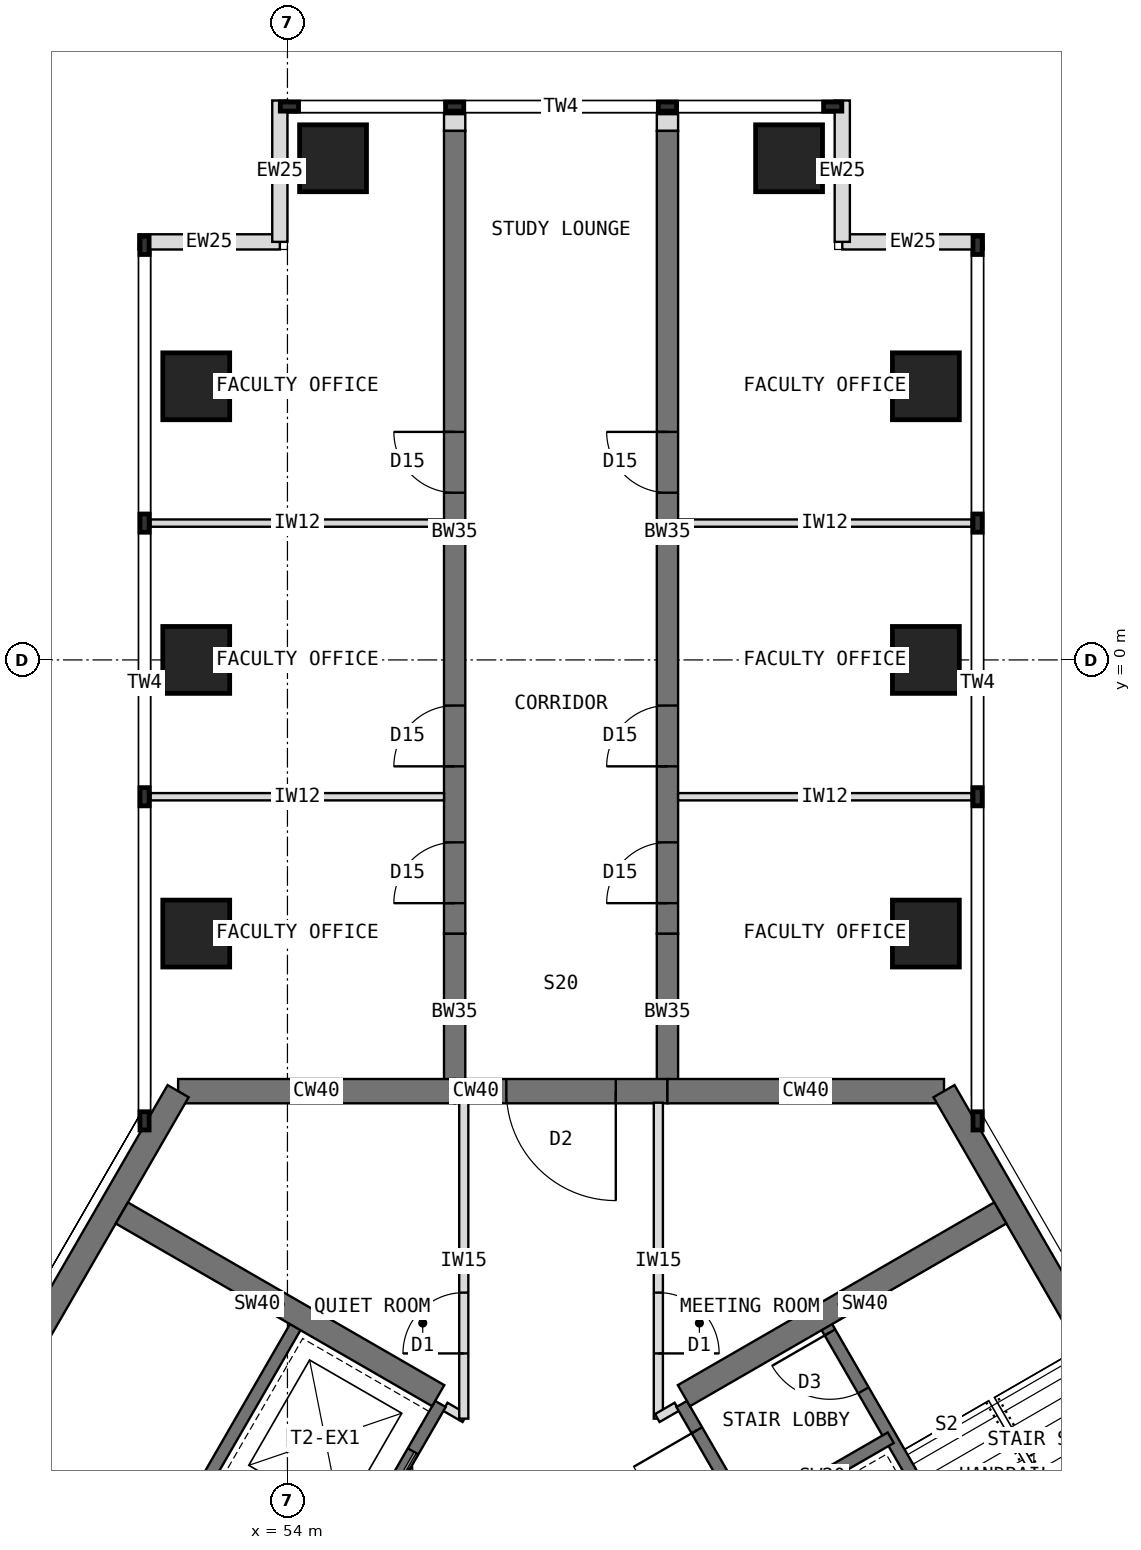
"""IFC4 building model, lengths in metres.
Left out: names, types, materials, properties, quantities, classifications, styles, units other than length and angle.
Written with IfcOpenShell. Run it as: python <this file> out.ifc"""

import sys

from ifc_helpers import new_model, si_unit, direction, frame, frame_2d, origin, origin_2d, place, context, subcontext, project, spatial, rectangle, extrude, element, fill, save


model = new_model("IFC4")
c1 = context("Model", 3, precision=1e-05, world=origin(), true_north=direction((0.0, 1.0)))
c2 = subcontext(c1, "Body", "Model", "MODEL_VIEW")
j1 = project(units=[si_unit("LENGTHUNIT", "METRE"), si_unit("PLANEANGLEUNIT", "RADIAN")], contexts=[c1])
p1 = place(None, origin())
s1 = spatial("IfcSite", under=j1, at=p1, CompositionType="ELEMENT")
p2 = place(p1, origin())
s2 = spatial("IfcBuilding", under=s1, at=p2, CompositionType="ELEMENT")
p3 = place(p2, frame((0.0, 0.0, 243.5)))
s3 = spatial("IfcBuildingStorey", under=s2, at=p3, CompositionType="ELEMENT", Elevation=243.5)
p4 = place(p3, frame((64.798, -7.092, 0.0), z_axis=(0.0, 0.0, 1.0), x_axis=(-1.0, 0.0, 0.0)))
e1 = element("IfcWall", 1, at=p4, inside=s3, PredefinedType="SHEAR", context=c2, shape_type="SweptSolid", body=[
    extrude(rectangle(XDim=4.548, YDim=0.4, at=frame_2d((2.274, 0.0))), origin(), (0.0, 0.0, 1.0), 4.0),
])
p5 = place(p3, frame((60.25, -7.092, 0.0), z_axis=(0.0, 0.0, 1.0), x_axis=(-1.0, 0.0, 0.0)))
e2 = element("IfcWall", 2, at=p5, inside=s3, PredefinedType="SHEAR", context=c2, shape_type="SweptSolid", body=[
    extrude(rectangle(XDim=3.5, YDim=0.4, at=frame_2d((1.75, 0.0))), origin(), (0.0, 0.0, 1.0), 4.0),
])
p6 = place(p5, frame((0.85, 0.0, 0.0)))
e3 = element("IfcOpeningElement", 3, at=p6, cuts=e2, PredefinedType="OPENING", context=c2, shape_type="SweptSolid", body=[
    extrude(rectangle(XDim=1.8, YDim=2.1, at=frame_2d((0.9, 1.05))), frame((0.0, 0.21, 0.0), z_axis=(0.0, -1.0, 0.0), x_axis=(1.0, 0.0, 0.0)), (0.0, 0.0, 1.0), 0.42),
])
p7 = place(p3, frame((56.75, -7.092, 0.0), z_axis=(0.0, 0.0, 1.0), x_axis=(-1.0, 0.0, 0.0)))
e4 = element("IfcWall", 4, at=p7, inside=s3, PredefinedType="SHEAR", context=c2, shape_type="SweptSolid", body=[
    extrude(rectangle(XDim=4.548, YDim=0.4, at=frame_2d((2.274, 0.0))), origin(), (0.0, 0.0, 1.0), 4.0),
])
for number, where, z_axis, x_axis in (
    (5, (52.202, -7.092, 0.0), (0.0, 0.0, 1.0), (-0.5, -0.866, 0.0)),
    (6, (71.096, -18.0, 0.0), (0.0, 0.0, 1.0), (-0.5, 0.866, 0.0)),
):
    element("IfcWall", number, at=place(p3, frame(where, z_axis=z_axis, x_axis=x_axis)), inside=s3, PredefinedType="SHEAR", context=c2, shape_type="SweptSolid", body=[
        extrude(rectangle(XDim=12.596, YDim=0.4, at=frame_2d((6.298, 0.0))), origin(), (0.0, 0.0, 1.0), 4.0),
    ])
p8 = place(p3, frame((56.75, -7.092, 0.0), z_axis=(0.0, 0.0, 1.0), x_axis=(0.0, 1.0, 0.0)))
e7 = element("IfcWall", 7, at=p8, inside=s3, PredefinedType="SHEAR", context=c2, shape_type="SweptSolid", body=[
    extrude(rectangle(XDim=2.592, YDim=0.35, at=frame_2d((1.296, 0.0))), origin(), (0.0, 0.0, 1.0), 4.0),
])
p9 = place(p3, frame((56.75, -4.5, 0.0), z_axis=(0.0, 0.0, 1.0), x_axis=(0.0, 1.0, 0.0)))
e8 = element("IfcWall", 8, at=p9, inside=s3, PredefinedType="SHEAR", context=c2, shape_type="SweptSolid", body=[
    extrude(rectangle(XDim=13.2, YDim=0.35, at=frame_2d((6.6, 0.0))), origin(), (0.0, 0.0, 1.0), 4.0),
])
p10 = place(p9, frame((0.5, 0.0, 0.0)))
e9 = element("IfcOpeningElement", 9, at=p10, cuts=e8, PredefinedType="OPENING", context=c2, shape_type="SweptSolid", body=[
    extrude(rectangle(XDim=1.0, YDim=2.1, at=frame_2d((0.5, 1.05))), frame((0.0, 0.185, 0.0), z_axis=(0.0, -1.0, 0.0), x_axis=(1.0, 0.0, 0.0)), (0.0, 0.0, 1.0), 0.37),
])
p11 = place(p9, frame((2.75, 0.0, 0.0)))
e10 = element("IfcOpeningElement", 10, at=p11, cuts=e8, PredefinedType="OPENING", context=c2, shape_type="SweptSolid", body=[
    extrude(rectangle(XDim=1.0, YDim=2.1, at=frame_2d((0.5, 1.05))), frame((0.0, 0.185, 0.0), z_axis=(0.0, -1.0, 0.0), x_axis=(1.0, 0.0, 0.0)), (0.0, 0.0, 1.0), 0.37),
])
p12 = place(p9, frame((7.25, 0.0, 0.0)))
e11 = element("IfcOpeningElement", 11, at=p12, cuts=e8, PredefinedType="OPENING", context=c2, shape_type="SweptSolid", body=[
    extrude(rectangle(XDim=1.0, YDim=2.1, at=frame_2d((0.5, 1.05))), frame((0.0, 0.185, 0.0), z_axis=(0.0, -1.0, 0.0), x_axis=(1.0, 0.0, 0.0)), (0.0, 0.0, 1.0), 0.37),
])
p13 = place(p3, frame((60.25, -7.092, 0.0), z_axis=(0.0, 0.0, 1.0), x_axis=(0.0, 1.0, 0.0)))
e12 = element("IfcWall", 12, at=p13, inside=s3, PredefinedType="SHEAR", context=c2, shape_type="SweptSolid", body=[
    extrude(rectangle(XDim=2.592, YDim=0.35, at=frame_2d((1.296, 0.0))), origin(), (0.0, 0.0, 1.0), 4.0),
])
p14 = place(p3, frame((60.25, -4.5, 0.0), z_axis=(0.0, 0.0, 1.0), x_axis=(0.0, 1.0, 0.0)))
e13 = element("IfcWall", 13, at=p14, inside=s3, PredefinedType="SHEAR", context=c2, shape_type="SweptSolid", body=[
    extrude(rectangle(XDim=13.2, YDim=0.35, at=frame_2d((6.6, 0.0))), origin(), (0.0, 0.0, 1.0), 4.0),
])
p15 = place(p14, frame((0.5, 0.0, 0.0)))
e14 = element("IfcOpeningElement", 14, at=p15, cuts=e13, PredefinedType="OPENING", context=c2, shape_type="SweptSolid", body=[
    extrude(rectangle(XDim=1.0, YDim=2.1, at=frame_2d((0.5, 1.05))), frame((0.0, 0.185, 0.0), z_axis=(0.0, -1.0, 0.0), x_axis=(1.0, 0.0, 0.0)), (0.0, 0.0, 1.0), 0.37),
])
p16 = place(p14, frame((2.75, 0.0, 0.0)))
e15 = element("IfcOpeningElement", 15, at=p16, cuts=e13, PredefinedType="OPENING", context=c2, shape_type="SweptSolid", body=[
    extrude(rectangle(XDim=1.0, YDim=2.1, at=frame_2d((0.5, 1.05))), frame((0.0, 0.185, 0.0), z_axis=(0.0, -1.0, 0.0), x_axis=(1.0, 0.0, 0.0)), (0.0, 0.0, 1.0), 0.37),
])
p17 = place(p14, frame((7.25, 0.0, 0.0)))
e16 = element("IfcOpeningElement", 16, at=p17, cuts=e13, PredefinedType="OPENING", context=c2, shape_type="SweptSolid", body=[
    extrude(rectangle(XDim=1.0, YDim=2.1, at=frame_2d((0.5, 1.05))), frame((0.0, 0.185, 0.0), z_axis=(0.0, -1.0, 0.0), x_axis=(1.0, 0.0, 0.0)), (0.0, 0.0, 1.0), 0.37),
])
for number, where, z_axis, x_axis in (
    (17, (52.5, -4.5, 0.0), (0.0, 0.0, 1.0), (1.0, 0.0, 0.0)),
    (18, (64.5, -4.5, 0.0), (0.0, 0.0, 1.0), (1.0, 0.0, 0.0)),
    (19, (52.5, 0.0, 0.0), (0.0, 0.0, 1.0), (1.0, 0.0, 0.0)),
    (20, (64.5, 0.0, 0.0), (0.0, 0.0, 1.0), (1.0, 0.0, 0.0)),
    (21, (52.5, 4.5, 0.0), (0.0, 0.0, 1.0), (1.0, 0.0, 0.0)),
    (22, (64.5, 4.5, 0.0), (0.0, 0.0, 1.0), (1.0, 0.0, 0.0)),
    (23, (54.75, 8.25, 0.0), (0.0, 0.0, 1.0), (1.0, 0.0, 0.0)),
    (24, (62.25, 8.25, 0.0), (0.0, 0.0, 1.0), (1.0, 0.0, 0.0)),
):
    element("IfcColumn", number, at=place(p3, frame(where, z_axis=z_axis, x_axis=x_axis)), inside=s3, PredefinedType="COLUMN", context=c2, shape_type="SweptSolid", body=[
        extrude(rectangle(XDim=1.1, YDim=1.1, at=origin_2d()), origin(), (0.0, 0.0, 1.0), 4.0),
    ])
for number, where, z_axis, x_axis in (
    (25, (51.55, 6.875, 0.0), (0.0, 0.0, 1.0), (1.0, 0.0, 0.0)),
    (26, (53.875, 6.875, 0.0), (0.0, 0.0, 1.0), (0.0, 1.0, 0.0)),
    (27, (65.45, 6.875, 0.0), (0.0, 0.0, 1.0), (-1.0, 0.0, 0.0)),
    (28, (63.125, 6.875, 0.0), (0.0, 0.0, 1.0), (0.0, 1.0, 0.0)),
):
    element("IfcWall", number, at=place(p3, frame(where, z_axis=z_axis, x_axis=x_axis)), inside=s3, PredefinedType="STANDARD", context=c2, shape_type="SweptSolid", body=[
        extrude(rectangle(XDim=2.325, YDim=0.25, at=frame_2d((1.163, 0.0))), origin(), (0.0, 0.0, 1.0), 3.8),
    ])
for number, where, z_axis, x_axis in (
    (29, (56.75, 8.7, 0.0), (0.0, 0.0, 1.0), (0.0, 1.0, 0.0)),
    (30, (60.25, 8.7, 0.0), (0.0, 0.0, 1.0), (0.0, 1.0, 0.0)),
):
    element("IfcWall", number, at=place(p3, frame(where, z_axis=z_axis, x_axis=x_axis)), inside=s3, PredefinedType="PARTITIONING", context=c2, shape_type="SweptSolid", body=[
        extrude(rectangle(XDim=0.275, YDim=0.35, at=frame_2d((0.138, 0.0))), origin(), (0.0, 0.0, 1.0), 3.8),
    ])
p18 = place(p3, frame((56.516, -12.236, 0.0), z_axis=(0.0, 0.0, 1.0), x_axis=(-0.49999894854, -0.866026010844, 0.0)))
e31 = element("IfcWall", 31, at=p18, inside=s3, PredefinedType="SHEAR", context=c2, shape_type="SweptSolid", body=[
    extrude(rectangle(XDim=8.0, YDim=0.2, at=frame_2d((4.0, 0.0))), origin(), (0.0, 0.0, 1.0), 4.0),
])
p19 = place(p18, frame((6.3, 0.0, 0.0)))
e32 = element("IfcOpeningElement", 32, at=p19, cuts=e31, PredefinedType="OPENING", context=c2, shape_type="SweptSolid", body=[
    extrude(rectangle(XDim=1.2, YDim=2.1, at=frame_2d((0.6, 1.05))), frame((0.0, 0.11, 0.0), z_axis=(0.0, -1.0, 0.0), x_axis=(1.0, 0.0, 0.0)), (0.0, 0.0, 1.0), 0.22),
])
p20 = place(p18, frame((0.9, 0.0, 0.0)))
e33 = element("IfcOpeningElement", 33, at=p20, cuts=e31, PredefinedType="OPENING", context=c2, shape_type="SweptSolid", body=[
    extrude(rectangle(XDim=1.1, YDim=2.2, at=frame_2d((0.55, 1.1))), frame((0.0, 0.11, 0.0), z_axis=(0.0, -1.0, 0.0), x_axis=(1.0, 0.0, 0.0)), (0.0, 0.0, 1.0), 0.22),
])
p21 = place(p18, frame((3.8, 0.0, 0.0)))
e34 = element("IfcOpeningElement", 34, at=p21, cuts=e31, PredefinedType="OPENING", context=c2, shape_type="SweptSolid", body=[
    extrude(rectangle(XDim=1.1, YDim=2.2, at=frame_2d((0.55, 1.1))), frame((0.0, 0.11, 0.0), z_axis=(0.0, -1.0, 0.0), x_axis=(1.0, 0.0, 0.0)), (0.0, 0.0, 1.0), 0.22),
])
p22 = place(p3, frame((54.98, -14.697, 0.0), z_axis=(0.0, 0.0, 1.0), x_axis=(-0.866062058628, 0.499936506574, 0.0)))
e35 = element("IfcWall", 35, at=p22, inside=s3, PredefinedType="SHEAR", context=c2, shape_type="SweptSolid", body=[
    extrude(rectangle(XDim=2.6, YDim=0.2, at=frame_2d((1.3, 0.0))), origin(), (0.0, 0.0, 1.0), 4.0),
])
p23 = place(p3, frame((54.178, -10.886, 0.0), z_axis=(0.0, 0.0, 1.0), x_axis=(-0.49999894854, -0.866026010844, 0.0)))
e36 = element("IfcWall", 36, at=p23, inside=s3, PredefinedType="SHEAR", context=c2, shape_type="SweptSolid", body=[
    extrude(rectangle(XDim=8.0, YDim=0.2, at=frame_2d((4.0, 0.0))), origin(), (0.0, 0.0, 1.0), 4.0),
])
p24 = place(p23, frame((6.8, 0.0, 0.0)))
e37 = element("IfcOpeningElement", 37, at=p24, cuts=e36, PredefinedType="OPENING", context=c2, shape_type="SweptSolid", body=[
    extrude(rectangle(XDim=0.9, YDim=2.1, at=frame_2d((0.45, 1.05))), frame((0.0, 0.11, 0.0), z_axis=(0.0, -1.0, 0.0), x_axis=(1.0, 0.0, 0.0)), (0.0, 0.0, 1.0), 0.22),
])
p25 = place(p3, frame((56.48, -12.099, 0.0), z_axis=(0.0, 0.0, 1.0), x_axis=(-0.866026570101, 0.499997979876, 0.0)))
e38 = element("IfcWall", 38, at=p25, inside=s3, PredefinedType="SHEAR", context=c2, shape_type="SweptSolid", body=[
    extrude(rectangle(XDim=6.008, YDim=0.4, at=frame_2d((3.004, 0.0))), origin(), (0.0, 0.0, 1.0), 4.0),
])
p26 = place(p3, frame((64.484, -19.164, 0.0), z_axis=(0.0, 0.0, 1.0), x_axis=(-0.49999894854, 0.866026010844, 0.0)))
e39 = element("IfcWall", 39, at=p26, inside=s3, PredefinedType="SHEAR", context=c2, shape_type="SweptSolid", body=[
    extrude(rectangle(XDim=8.0, YDim=0.2, at=frame_2d((4.0, 0.0))), origin(), (0.0, 0.0, 1.0), 4.0),
])
p27 = place(p26, frame((6.3, 0.0, 0.0)))
e40 = element("IfcOpeningElement", 40, at=p27, cuts=e39, PredefinedType="OPENING", context=c2, shape_type="SweptSolid", body=[
    extrude(rectangle(XDim=1.2, YDim=2.1, at=frame_2d((0.6, 1.05))), frame((0.0, 0.11, 0.0), z_axis=(0.0, -1.0, 0.0), x_axis=(1.0, 0.0, 0.0)), (0.0, 0.0, 1.0), 0.22),
])
p28 = place(p26, frame((0.9, 0.0, 0.0)))
e41 = element("IfcOpeningElement", 41, at=p28, cuts=e39, PredefinedType="OPENING", context=c2, shape_type="SweptSolid", body=[
    extrude(rectangle(XDim=1.1, YDim=2.2, at=frame_2d((0.55, 1.1))), frame((0.0, 0.11, 0.0), z_axis=(0.0, -1.0, 0.0), x_axis=(1.0, 0.0, 0.0)), (0.0, 0.0, 1.0), 0.22),
])
p29 = place(p26, frame((3.8, 0.0, 0.0)))
e42 = element("IfcOpeningElement", 42, at=p29, cuts=e39, PredefinedType="OPENING", context=c2, shape_type="SweptSolid", body=[
    extrude(rectangle(XDim=1.1, YDim=2.2, at=frame_2d((0.55, 1.1))), frame((0.0, 0.11, 0.0), z_axis=(0.0, -1.0, 0.0), x_axis=(1.0, 0.0, 0.0)), (0.0, 0.0, 1.0), 0.22),
])
p30 = place(p3, frame((61.67, -14.091, 0.0), z_axis=(0.0, 0.0, 1.0), x_axis=(0.86603858612, 0.49997716683, 0.0)))
e43 = element("IfcWall", 43, at=p30, inside=s3, PredefinedType="SHEAR", context=c2, shape_type="SweptSolid", body=[
    extrude(rectangle(XDim=2.6, YDim=0.2, at=frame_2d((1.3, 0.0))), origin(), (0.0, 0.0, 1.0), 4.0),
])
p31 = place(p3, frame((66.822, -17.814, 0.0), z_axis=(0.0, 0.0, 1.0), x_axis=(-0.49999894854, 0.866026010844, 0.0)))
e44 = element("IfcWall", 44, at=p31, inside=s3, PredefinedType="SHEAR", context=c2, shape_type="SweptSolid", body=[
    extrude(rectangle(XDim=8.0, YDim=0.2, at=frame_2d((4.0, 0.0))), origin(), (0.0, 0.0, 1.0), 4.0),
])
p32 = place(p31, frame((6.7, 0.0, 0.0)))
e45 = element("IfcOpeningElement", 45, at=p32, cuts=e44, PredefinedType="OPENING", context=c2, shape_type="SweptSolid", body=[
    extrude(rectangle(XDim=1.1, YDim=2.1, at=frame_2d((0.55, 1.05))), frame((0.0, 0.11, 0.0), z_axis=(0.0, -1.0, 0.0), x_axis=(1.0, 0.0, 0.0)), (0.0, 0.0, 1.0), 0.22),
])
p33 = place(p3, frame((60.52, -12.099, 0.0), z_axis=(0.0, 0.0, 1.0), x_axis=(0.866026570101, 0.499997979876, 0.0)))
e46 = element("IfcWall", 46, at=p33, inside=s3, PredefinedType="SHEAR", context=c2, shape_type="SweptSolid", body=[
    extrude(rectangle(XDim=6.008, YDim=0.4, at=frame_2d((3.004, 0.0))), origin(), (0.0, 0.0, 1.0), 4.0),
])
for number, where, z_axis, x_axis in (
    (47, (56.575, -2.25, 0.0), (0.0, 0.0, 1.0), (-1.0, 0.0, 0.0)),
    (48, (56.575, 2.25, 0.0), (0.0, 0.0, 1.0), (-1.0, 0.0, 0.0)),
    (49, (60.425, -2.25, 0.0), (0.0, 0.0, 1.0), (1.0, 0.0, 0.0)),
    (50, (60.425, 2.25, 0.0), (0.0, 0.0, 1.0), (1.0, 0.0, 0.0)),
):
    element("IfcWall", number, at=place(p3, frame(where, z_axis=z_axis, x_axis=x_axis)), inside=s3, PredefinedType="PARTITIONING", context=c2, shape_type="SweptSolid", body=[
        extrude(rectangle(XDim=4.825, YDim=0.12, at=frame_2d((2.413, 0.0))), origin(), (0.0, 0.0, 1.0), 3.8),
    ])
p34 = place(p3, frame((56.594, -12.281, 0.0), z_axis=(0.0, 0.0, 1.0), x_axis=(0.866261881104, -0.499590185398, 0.0)))
e51 = element("IfcWall", 51, at=p34, inside=s3, PredefinedType="PARTITIONING", context=c2, shape_type="SweptSolid", body=[
    extrude(rectangle(XDim=0.373, YDim=0.15, at=frame_2d((0.187, 0.0))), origin(), (0.0, 0.0, 1.0), 3.8),
])
p35 = place(p3, frame((56.9, -12.477, 0.0), z_axis=(0.0, 0.0, 1.0), x_axis=(0.0, 1.0, 0.0)))
e52 = element("IfcWall", 52, at=p35, inside=s3, PredefinedType="PARTITIONING", context=c2, shape_type="SweptSolid", body=[
    extrude(rectangle(XDim=5.196, YDim=0.15, at=frame_2d((2.598, 0.0))), origin(), (0.0, 0.0, 1.0), 3.8),
])
p36 = place(p35, frame((1.073, 0.0, 0.0)))
e53 = element("IfcOpeningElement", 53, at=p36, cuts=e52, PredefinedType="OPENING", context=c2, shape_type="SweptSolid", body=[
    extrude(rectangle(XDim=1.0, YDim=2.1, at=frame_2d((0.5, 1.05))), frame((0.0, 0.085, 0.0), z_axis=(0.0, -1.0, 0.0), x_axis=(1.0, 0.0, 0.0)), (0.0, 0.0, 1.0), 0.17),
])
p37 = place(p3, frame((60.1, -7.282, 0.0), z_axis=(0.0, 0.0, 1.0), x_axis=(0.0, -1.0, 0.0)))
e54 = element("IfcWall", 54, at=p37, inside=s3, PredefinedType="PARTITIONING", context=c2, shape_type="SweptSolid", body=[
    extrude(rectangle(XDim=5.196, YDim=0.15, at=frame_2d((2.598, 0.0))), origin(), (0.0, 0.0, 1.0), 3.8),
])
p38 = place(p37, frame((3.123, 0.0, 0.0)))
e55 = element("IfcOpeningElement", 55, at=p38, cuts=e54, PredefinedType="OPENING", context=c2, shape_type="SweptSolid", body=[
    extrude(rectangle(XDim=1.0, YDim=2.1, at=frame_2d((0.5, 1.05))), frame((0.0, 0.085, 0.0), z_axis=(0.0, -1.0, 0.0), x_axis=(1.0, 0.0, 0.0)), (0.0, 0.0, 1.0), 0.17),
])
p39 = place(p3, frame((60.083, -12.467, 0.0), z_axis=(0.0, 0.0, 1.0), x_axis=(0.866261881104, 0.499590185398, 0.0)))
e56 = element("IfcWall", 56, at=p39, inside=s3, PredefinedType="PARTITIONING", context=c2, shape_type="SweptSolid", body=[
    extrude(rectangle(XDim=0.373, YDim=0.15, at=frame_2d((0.187, 0.0))), origin(), (0.0, 0.0, 1.0), 3.8),
])
p40 = place(p20, origin())
e57 = element("IfcDoor", 57, at=p40, inside=s3, OperationType="DOUBLE_DOOR_SLIDING", PredefinedType="DOOR", context=c2, shape_type="SweptSolid", body=[
    extrude(rectangle(XDim=1.1, YDim=2.2, at=frame_2d((0.55, 1.1))), frame((0.0, 0.025, 0.0), z_axis=(0.0, -1.0, 0.0), x_axis=(1.0, 0.0, 0.0)), (0.0, 0.0, 1.0), 0.05),
])
fill(e33, e57)
p41 = place(p27, origin())
e58 = element("IfcDoor", 58, at=p41, inside=s3, OperationType="SINGLE_SWING_RIGHT", PredefinedType="DOOR", context=c2, shape_type="SweptSolid", body=[
    extrude(rectangle(XDim=1.2, YDim=2.1, at=frame_2d((0.6, 1.05))), frame((0.0, 0.025, 0.0), z_axis=(0.0, -1.0, 0.0), x_axis=(1.0, 0.0, 0.0)), (0.0, 0.0, 1.0), 0.05),
])
fill(e40, e58)
p42 = place(p32, origin())
e59 = element("IfcDoor", 59, at=p42, inside=s3, OperationType="SINGLE_SWING_RIGHT", PredefinedType="DOOR", context=c2, shape_type="SweptSolid", body=[
    extrude(rectangle(XDim=1.1, YDim=2.1, at=frame_2d((0.55, 1.05))), frame((0.0, 0.025, 0.0), z_axis=(0.0, -1.0, 0.0), x_axis=(1.0, 0.0, 0.0)), (0.0, 0.0, 1.0), 0.05),
])
fill(e45, e59)
p43 = place(p6, origin())
e60 = element("IfcDoor", 60, at=p43, inside=s3, OperationType="DOUBLE_DOOR_DOUBLE_SWING", PredefinedType="DOOR", context=c2, shape_type="SweptSolid", body=[
    extrude(rectangle(XDim=1.8, YDim=2.1, at=frame_2d((0.9, 1.05))), frame((0.0, 0.025, 0.0), z_axis=(0.0, -1.0, 0.0), x_axis=(1.0, 0.0, 0.0)), (0.0, 0.0, 1.0), 0.05),
])
fill(e3, e60)
p44 = place(p38, origin())
e61 = element("IfcDoor", 61, at=p44, inside=s3, OperationType="SINGLE_SWING_RIGHT", PredefinedType="DOOR", context=c2, shape_type="SweptSolid", body=[
    extrude(rectangle(XDim=1.0, YDim=2.1, at=frame_2d((0.5, 1.05))), frame((0.0, 0.025, 0.0), z_axis=(0.0, -1.0, 0.0), x_axis=(1.0, 0.0, 0.0)), (0.0, 0.0, 1.0), 0.05),
])
fill(e55, e61)
p45 = place(p36, origin())
e62 = element("IfcDoor", 62, at=p45, inside=s3, OperationType="SINGLE_SWING_LEFT", PredefinedType="DOOR", context=c2, shape_type="SweptSolid", body=[
    extrude(rectangle(XDim=1.0, YDim=2.1, at=frame_2d((0.5, 1.05))), frame((0.0, 0.025, 0.0), z_axis=(0.0, -1.0, 0.0), x_axis=(1.0, 0.0, 0.0)), (0.0, 0.0, 1.0), 0.05),
])
fill(e53, e62)
p46 = place(p10, origin())
e63 = element("IfcDoor", 63, at=p46, inside=s3, OperationType="SINGLE_SWING_LEFT", PredefinedType="DOOR", context=c2, shape_type="SweptSolid", body=[
    extrude(rectangle(XDim=1.0, YDim=2.1, at=frame_2d((0.5, 1.05))), frame((0.0, 0.025, 0.0), z_axis=(0.0, -1.0, 0.0), x_axis=(1.0, 0.0, 0.0)), (0.0, 0.0, 1.0), 0.05),
])
fill(e9, e63)
p47 = place(p11, origin())
e64 = element("IfcDoor", 64, at=p47, inside=s3, OperationType="SINGLE_SWING_LEFT", PredefinedType="DOOR", context=c2, shape_type="SweptSolid", body=[
    extrude(rectangle(XDim=1.0, YDim=2.1, at=frame_2d((0.5, 1.05))), frame((0.0, 0.025, 0.0), z_axis=(0.0, -1.0, 0.0), x_axis=(1.0, 0.0, 0.0)), (0.0, 0.0, 1.0), 0.05),
])
fill(e10, e64)
p48 = place(p12, origin())
e65 = element("IfcDoor", 65, at=p48, inside=s3, OperationType="SINGLE_SWING_RIGHT", PredefinedType="DOOR", context=c2, shape_type="SweptSolid", body=[
    extrude(rectangle(XDim=1.0, YDim=2.1, at=frame_2d((0.5, 1.05))), frame((0.0, 0.025, 0.0), z_axis=(0.0, -1.0, 0.0), x_axis=(1.0, 0.0, 0.0)), (0.0, 0.0, 1.0), 0.05),
])
fill(e11, e65)
p49 = place(p15, origin())
e66 = element("IfcDoor", 66, at=p49, inside=s3, OperationType="SINGLE_SWING_LEFT", PredefinedType="DOOR", context=c2, shape_type="SweptSolid", body=[
    extrude(rectangle(XDim=1.0, YDim=2.1, at=frame_2d((0.5, 1.05))), frame((0.0, 0.025, 0.0), z_axis=(0.0, -1.0, 0.0), x_axis=(1.0, 0.0, 0.0)), (0.0, 0.0, 1.0), 0.05),
])
fill(e14, e66)
p50 = place(p16, origin())
e67 = element("IfcDoor", 67, at=p50, inside=s3, OperationType="SINGLE_SWING_LEFT", PredefinedType="DOOR", context=c2, shape_type="SweptSolid", body=[
    extrude(rectangle(XDim=1.0, YDim=2.1, at=frame_2d((0.5, 1.05))), frame((0.0, 0.025, 0.0), z_axis=(0.0, -1.0, 0.0), x_axis=(1.0, 0.0, 0.0)), (0.0, 0.0, 1.0), 0.05),
])
fill(e15, e67)
p51 = place(p17, origin())
e68 = element("IfcDoor", 68, at=p51, inside=s3, OperationType="SINGLE_SWING_RIGHT", PredefinedType="DOOR", context=c2, shape_type="SweptSolid", body=[
    extrude(rectangle(XDim=1.0, YDim=2.1, at=frame_2d((0.5, 1.05))), frame((0.0, 0.025, 0.0), z_axis=(0.0, -1.0, 0.0), x_axis=(1.0, 0.0, 0.0)), (0.0, 0.0, 1.0), 0.05),
])
fill(e16, e68)
save(model, sys.argv[1])
